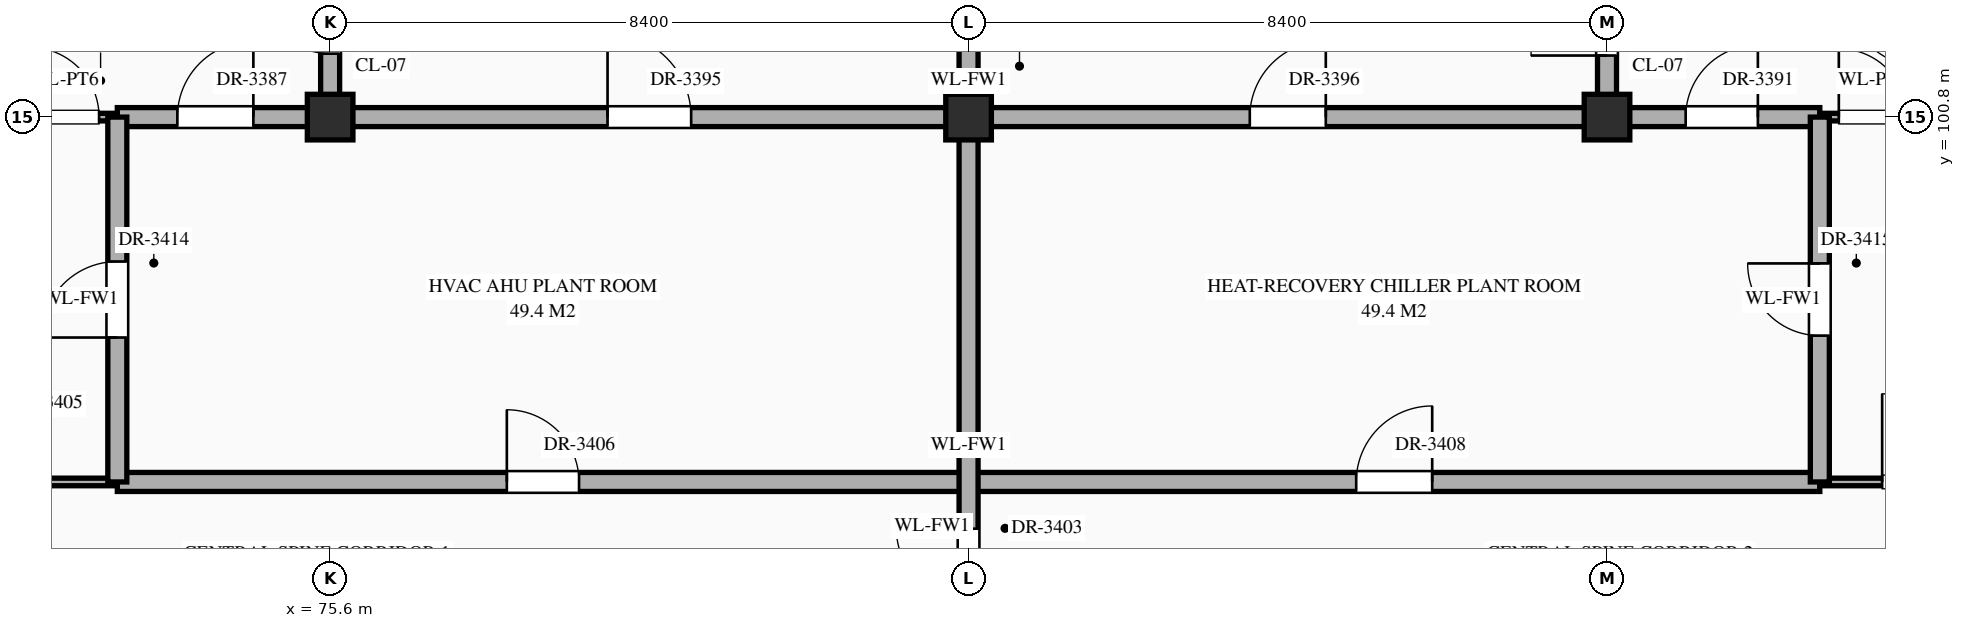
"""IFC4 building model, lengths in metres.
Left out: names, types, materials, properties, quantities, classifications, styles, units other than length and angle.
Written with IfcOpenShell. Run it as: python <this file> out.ifc"""

import sys

from ifc_helpers import new_model, si_unit, direction, frame, frame_2d, origin, origin_2d, place, context, subcontext, project, spatial, rectangle, extrude, element, fill, save


model = new_model("IFC4")
c1 = context("Model", 3, precision=1e-05, world=origin(), true_north=direction((0.0, 1.0)))
c2 = subcontext(c1, "Body", "Model", "MODEL_VIEW")
j1 = project(units=[si_unit("LENGTHUNIT", "METRE"), si_unit("PLANEANGLEUNIT", "RADIAN")], contexts=[c1])
p1 = place(None, origin())
s1 = spatial("IfcSite", under=j1, at=p1, CompositionType="ELEMENT")
p2 = place(p1, origin())
s2 = spatial("IfcBuilding", under=s1, at=p2, CompositionType="ELEMENT")
p3 = place(p2, frame((0.0, 0.0, 68.7)))
s3 = spatial("IfcBuildingStorey", under=s2, at=p3, CompositionType="ELEMENT", Elevation=68.7)
for number, where, z_axis, x_axis in (
    (1, (75.6, 100.8, 0.0), (0.0, 0.0, 1.0), (1.0, 0.0, 0.0)),
    (2, (84.0, 100.8, 0.0), (0.0, 0.0, 1.0), (1.0, 0.0, 0.0)),
    (3, (92.4, 100.8, 0.0), (0.0, 0.0, 1.0), (1.0, 0.0, 0.0)),
):
    element("IfcColumn", number, at=place(p3, frame(where, z_axis=z_axis, x_axis=x_axis)), inside=s3, PredefinedType="COLUMN", context=c2, shape_type="SweptSolid", body=[
        extrude(rectangle(XDim=0.6, YDim=0.6, at=origin_2d()), origin(), (0.0, 0.0, 1.0), 4.5),
    ])
p4 = place(p3, frame((70.0, 96.0, 0.0), z_axis=(0.0, 0.0, 1.0), x_axis=(1.0, 0.0, 0.0)))
e4 = element("IfcWall", 4, at=p4, inside=s3, PredefinedType="STANDARD", context=c2, shape_type="SweptSolid", body=[
    extrude(rectangle(XDim=2.8, YDim=0.1, at=frame_2d((1.4, 0.0))), origin(), (0.0, 0.0, 1.0), 4.12),
])
p5 = place(p4, frame((0.9, 0.0, 0.0)))
e5 = element("IfcOpeningElement", 5, at=p5, cuts=e4, PredefinedType="OPENING", context=c2, shape_type="SweptSolid", body=[
    extrude(rectangle(XDim=1.0, YDim=2.25, at=frame_2d((0.5, 1.125))), frame((0.0, 0.062, 0.0), z_axis=(0.0, -1.0, 0.0), x_axis=(1.0, 0.0, 0.0)), (0.0, 0.0, 1.0), 0.124),
])
p6 = place(p3, frame((72.8, 96.0, 0.0), z_axis=(0.0, 0.0, 1.0), x_axis=(1.0, 0.0, 0.0)))
e6 = element("IfcWall", 6, at=p6, inside=s3, PredefinedType="STANDARD", context=c2, shape_type="SweptSolid", body=[
    extrude(rectangle(XDim=22.4, YDim=0.25, at=frame_2d((11.2, 0.0))), origin(), (0.0, 0.0, 1.0), 4.12),
])
p7 = place(p6, frame((5.125, 0.0, 0.0)))
e7 = element("IfcOpeningElement", 7, at=p7, cuts=e6, PredefinedType="OPENING", context=c2, shape_type="SweptSolid", body=[
    extrude(rectangle(XDim=0.95, YDim=2.15, at=frame_2d((0.475, 1.075))), frame((0.0, 0.137, 0.0), z_axis=(0.0, -1.0, 0.0), x_axis=(1.0, 0.0, 0.0)), (0.0, 0.0, 1.0), 0.274),
])
p8 = place(p6, frame((16.3, 0.0, 0.0)))
e8 = element("IfcOpeningElement", 8, at=p8, cuts=e6, PredefinedType="OPENING", context=c2, shape_type="SweptSolid", body=[
    extrude(rectangle(XDim=1.0, YDim=2.2, at=frame_2d((0.5, 1.1))), frame((0.0, 0.137, 0.0), z_axis=(0.0, -1.0, 0.0), x_axis=(1.0, 0.0, 0.0)), (0.0, 0.0, 1.0), 0.274),
])
p9 = place(p3, frame((95.2, 96.0, 0.0), z_axis=(0.0, 0.0, 1.0), x_axis=(1.0, 0.0, 0.0)))
e9 = element("IfcWall", 9, at=p9, inside=s3, PredefinedType="STANDARD", context=c2, shape_type="SweptSolid", body=[
    extrude(rectangle(XDim=2.8, YDim=0.1, at=frame_2d((1.4, 0.0))), origin(), (0.0, 0.0, 1.0), 4.12),
])
p10 = place(p9, frame((0.82, 0.0, 0.0)))
e10 = element("IfcOpeningElement", 10, at=p10, cuts=e9, PredefinedType="OPENING", context=c2, shape_type="SweptSolid", body=[
    extrude(rectangle(XDim=1.16, YDim=2.3, at=frame_2d((0.58, 1.15))), frame((0.0, 0.062, 0.0), z_axis=(0.0, -1.0, 0.0), x_axis=(1.0, 0.0, 0.0)), (0.0, 0.0, 1.0), 0.124),
])
p11 = place(p3, frame((71.4, 100.8, 0.0), z_axis=(0.0, 0.0, 1.0), x_axis=(1.0, 0.0, 0.0)))
e11 = element("IfcWall", 11, at=p11, inside=s3, PredefinedType="STANDARD", context=c2, shape_type="SweptSolid", body=[
    extrude(rectangle(XDim=1.4, YDim=0.1, at=frame_2d((0.7, 0.0))), origin(), (0.0, 0.0, 1.0), 3.27),
])
p12 = place(p11, frame((0.24, 0.0, 0.0)))
e12 = element("IfcOpeningElement", 12, at=p12, cuts=e11, PredefinedType="OPENING", context=c2, shape_type="SweptSolid", body=[
    extrude(rectangle(XDim=0.92, YDim=2.15, at=frame_2d((0.46, 1.075))), frame((0.0, 0.062, 0.0), z_axis=(0.0, -1.0, 0.0), x_axis=(1.0, 0.0, 0.0)), (0.0, 0.0, 1.0), 0.124),
])
p13 = place(p3, frame((72.8, 100.8, 0.0), z_axis=(0.0, 0.0, 1.0), x_axis=(1.0, 0.0, 0.0)))
e13 = element("IfcWall", 13, at=p13, inside=s3, PredefinedType="STANDARD", context=c2, shape_type="SweptSolid", body=[
    extrude(rectangle(XDim=22.4, YDim=0.25, at=frame_2d((11.2, 0.0))), origin(), (0.0, 0.0, 1.0), 3.27),
])
p14 = place(p13, frame((0.79, 0.0, 0.0)))
e14 = element("IfcOpeningElement", 14, at=p14, cuts=e13, PredefinedType="OPENING", context=c2, shape_type="SweptSolid", body=[
    extrude(rectangle(XDim=1.0, YDim=2.2, at=frame_2d((0.5, 1.1))), frame((0.0, 0.137, 0.0), z_axis=(0.0, -1.0, 0.0), x_axis=(1.0, 0.0, 0.0)), (0.0, 0.0, 1.0), 0.274),
])
p15 = place(p13, frame((20.635, 0.0, 0.0)))
e15 = element("IfcOpeningElement", 15, at=p15, cuts=e13, PredefinedType="OPENING", context=c2, shape_type="SweptSolid", body=[
    extrude(rectangle(XDim=0.95, YDim=2.15, at=frame_2d((0.475, 1.075))), frame((0.0, 0.137, 0.0), z_axis=(0.0, -1.0, 0.0), x_axis=(1.0, 0.0, 0.0)), (0.0, 0.0, 1.0), 0.274),
])
p16 = place(p13, frame((6.45, 0.0, 0.0)))
e16 = element("IfcOpeningElement", 16, at=p16, cuts=e13, PredefinedType="OPENING", context=c2, shape_type="SweptSolid", body=[
    extrude(rectangle(XDim=1.1, YDim=2.2, at=frame_2d((0.55, 1.1))), frame((0.0, 0.137, 0.0), z_axis=(0.0, -1.0, 0.0), x_axis=(1.0, 0.0, 0.0)), (0.0, 0.0, 1.0), 0.274),
])
p17 = place(p13, frame((14.9, 0.0, 0.0)))
e17 = element("IfcOpeningElement", 17, at=p17, cuts=e13, PredefinedType="OPENING", context=c2, shape_type="SweptSolid", body=[
    extrude(rectangle(XDim=1.0, YDim=2.2, at=frame_2d((0.5, 1.1))), frame((0.0, 0.137, 0.0), z_axis=(0.0, -1.0, 0.0), x_axis=(1.0, 0.0, 0.0)), (0.0, 0.0, 1.0), 0.274),
])
p18 = place(p3, frame((95.2, 100.8, 0.0), z_axis=(0.0, 0.0, 1.0), x_axis=(1.0, 0.0, 0.0)))
e18 = element("IfcWall", 18, at=p18, inside=s3, PredefinedType="STANDARD", context=c2, shape_type="SweptSolid", body=[
    extrude(rectangle(XDim=1.4, YDim=0.1, at=frame_2d((0.7, 0.0))), origin(), (0.0, 0.0, 1.0), 3.27),
])
p19 = place(p18, frame((0.25, 0.0, 0.0)))
e19 = element("IfcOpeningElement", 19, at=p19, cuts=e18, PredefinedType="OPENING", context=c2, shape_type="SweptSolid", body=[
    extrude(rectangle(XDim=0.9, YDim=2.15, at=frame_2d((0.45, 1.075))), frame((0.0, 0.062, 0.0), z_axis=(0.0, -1.0, 0.0), x_axis=(1.0, 0.0, 0.0)), (0.0, 0.0, 1.0), 0.124),
])
p20 = place(p3, frame((72.8, 96.0, 0.0), z_axis=(0.0, 0.0, 1.0), x_axis=(0.0, 1.0, 0.0)))
e20 = element("IfcWall", 20, at=p20, inside=s3, PredefinedType="STANDARD", context=c2, shape_type="SweptSolid", body=[
    extrude(rectangle(XDim=4.8, YDim=0.25, at=frame_2d((2.4, 0.0))), origin(), (0.0, 0.0, 1.0), 4.12),
])
p21 = place(p20, frame((1.9, 0.0, 0.0)))
e21 = element("IfcOpeningElement", 21, at=p21, cuts=e20, PredefinedType="OPENING", context=c2, shape_type="SweptSolid", body=[
    extrude(rectangle(XDim=1.0, YDim=2.2, at=frame_2d((0.5, 1.1))), frame((0.0, 0.137, 0.0), z_axis=(0.0, -1.0, 0.0), x_axis=(1.0, 0.0, 0.0)), (0.0, 0.0, 1.0), 0.274),
])
p22 = place(p3, frame((75.6, 100.8, 0.0), z_axis=(0.0, 0.0, 1.0), x_axis=(0.0, 1.0, 0.0)))
e22 = element("IfcWall", 22, at=p22, inside=s3, PredefinedType="STANDARD", context=c2, shape_type="SweptSolid", body=[
    extrude(rectangle(XDim=3.6, YDim=0.25, at=frame_2d((1.8, 0.0))), origin(), (0.0, 0.0, 1.0), 3.37),
])
p23 = place(p22, frame((0.835, 0.0, 0.0)))
e23 = element("IfcOpeningElement", 23, at=p23, cuts=e22, PredefinedType="OPENING", context=c2, shape_type="SweptSolid", body=[
    extrude(rectangle(XDim=0.95, YDim=2.15, at=frame_2d((0.475, 1.075))), frame((0.0, 0.137, 0.0), z_axis=(0.0, -1.0, 0.0), x_axis=(1.0, 0.0, 0.0)), (0.0, 0.0, 1.0), 0.274),
])
p24 = place(p3, frame((84.0, 86.44, 0.0), z_axis=(0.0, 0.0, 1.0), x_axis=(0.0, 1.0, 0.0)))
e24 = element("IfcWall", 24, at=p24, inside=s3, PredefinedType="STANDARD", context=c2, shape_type="SweptSolid", body=[
    extrude(rectangle(XDim=17.96, YDim=0.25, at=frame_2d((8.98, 0.0))), origin(), (0.0, 0.0, 1.0), 3.37),
])
p25 = place(p24, frame((15.52, 0.0, 0.0)))
e25 = element("IfcOpeningElement", 25, at=p25, cuts=e24, PredefinedType="OPENING", context=c2, shape_type="SweptSolid", body=[
    extrude(rectangle(XDim=1.5, YDim=2.25, at=frame_2d((0.75, 1.125))), frame((0.0, 0.137, 0.0), z_axis=(0.0, -1.0, 0.0), x_axis=(1.0, 0.0, 0.0)), (0.0, 0.0, 1.0), 0.274),
])
p26 = place(p24, frame((5.35, 0.0, 0.0)))
e26 = element("IfcOpeningElement", 26, at=p26, cuts=e24, PredefinedType="OPENING", context=c2, shape_type="SweptSolid", body=[
    extrude(rectangle(XDim=1.0, YDim=2.2, at=frame_2d((0.5, 1.1))), frame((0.0, 0.137, 0.0), z_axis=(0.0, -1.0, 0.0), x_axis=(1.0, 0.0, 0.0)), (0.0, 0.0, 1.0), 0.274),
])
p27 = place(p24, frame((7.995, 0.0, 0.0)))
e27 = element("IfcOpeningElement", 27, at=p27, cuts=e24, PredefinedType="OPENING", context=c2, shape_type="SweptSolid", body=[
    extrude(rectangle(XDim=0.95, YDim=2.15, at=frame_2d((0.475, 1.075))), frame((0.0, 0.137, 0.0), z_axis=(0.0, -1.0, 0.0), x_axis=(1.0, 0.0, 0.0)), (0.0, 0.0, 1.0), 0.274),
])
p28 = place(p3, frame((92.4, 100.8, 0.0), z_axis=(0.0, 0.0, 1.0), x_axis=(0.0, 1.0, 0.0)))
e28 = element("IfcWall", 28, at=p28, inside=s3, PredefinedType="STANDARD", context=c2, shape_type="SweptSolid", body=[
    extrude(rectangle(XDim=3.6, YDim=0.25, at=frame_2d((1.8, 0.0))), origin(), (0.0, 0.0, 1.0), 3.37),
])
p29 = place(p28, frame((0.81, 0.0, 0.0)))
e29 = element("IfcOpeningElement", 29, at=p29, cuts=e28, PredefinedType="OPENING", context=c2, shape_type="SweptSolid", body=[
    extrude(rectangle(XDim=1.0, YDim=2.2, at=frame_2d((0.5, 1.1))), frame((0.0, 0.137, 0.0), z_axis=(0.0, -1.0, 0.0), x_axis=(1.0, 0.0, 0.0)), (0.0, 0.0, 1.0), 0.274),
])
p30 = place(p3, frame((95.2, 96.0, 0.0), z_axis=(0.0, 0.0, 1.0), x_axis=(0.0, 1.0, 0.0)))
e30 = element("IfcWall", 30, at=p30, inside=s3, PredefinedType="STANDARD", context=c2, shape_type="SweptSolid", body=[
    extrude(rectangle(XDim=4.8, YDim=0.25, at=frame_2d((2.4, 0.0))), origin(), (0.0, 0.0, 1.0), 4.12),
])
p31 = place(p30, frame((1.925, 0.0, 0.0)))
e31 = element("IfcOpeningElement", 31, at=p31, cuts=e30, PredefinedType="OPENING", context=c2, shape_type="SweptSolid", body=[
    extrude(rectangle(XDim=0.95, YDim=2.15, at=frame_2d((0.475, 1.075))), frame((0.0, 0.137, 0.0), z_axis=(0.0, -1.0, 0.0), x_axis=(1.0, 0.0, 0.0)), (0.0, 0.0, 1.0), 0.274),
])
p32 = place(p23, origin())
e32 = element("IfcDoor", 32, at=p32, inside=s3, OperationType="SINGLE_SWING_RIGHT", PredefinedType="DOOR", context=c2, shape_type="SweptSolid", body=[
    extrude(rectangle(XDim=0.95, YDim=2.15, at=frame_2d((0.475, 1.075))), frame((0.0, 0.025, 0.0), z_axis=(0.0, -1.0, 0.0), x_axis=(1.0, 0.0, 0.0)), (0.0, 0.0, 1.0), 0.05),
])
fill(e23, e32)
p33 = place(p12, origin())
e33 = element("IfcDoor", 33, at=p33, inside=s3, OperationType="SINGLE_SWING_LEFT", PredefinedType="DOOR", context=c2, shape_type="SweptSolid", body=[
    extrude(rectangle(XDim=0.92, YDim=2.15, at=frame_2d((0.46, 1.075))), frame((0.0, 0.025, 0.0), z_axis=(0.0, -1.0, 0.0), x_axis=(1.0, 0.0, 0.0)), (0.0, 0.0, 1.0), 0.05),
])
fill(e12, e33)
p34 = place(p14, origin())
e34 = element("IfcDoor", 34, at=p34, inside=s3, OperationType="SINGLE_SWING_RIGHT", PredefinedType="DOOR", context=c2, shape_type="SweptSolid", body=[
    extrude(rectangle(XDim=1.0, YDim=2.2, at=frame_2d((0.5, 1.1))), frame((0.0, 0.025, 0.0), z_axis=(0.0, -1.0, 0.0), x_axis=(1.0, 0.0, 0.0)), (0.0, 0.0, 1.0), 0.05),
])
fill(e14, e34)
p35 = place(p29, origin())
e35 = element("IfcDoor", 35, at=p35, inside=s3, OperationType="SINGLE_SWING_LEFT", PredefinedType="DOOR", context=c2, shape_type="SweptSolid", body=[
    extrude(rectangle(XDim=1.0, YDim=2.2, at=frame_2d((0.5, 1.1))), frame((0.0, 0.025, 0.0), z_axis=(0.0, -1.0, 0.0), x_axis=(1.0, 0.0, 0.0)), (0.0, 0.0, 1.0), 0.05),
])
fill(e29, e35)
p36 = place(p15, origin())
e36 = element("IfcDoor", 36, at=p36, inside=s3, OperationType="SINGLE_SWING_RIGHT", PredefinedType="DOOR", context=c2, shape_type="SweptSolid", body=[
    extrude(rectangle(XDim=0.95, YDim=2.15, at=frame_2d((0.475, 1.075))), frame((0.0, 0.025, 0.0), z_axis=(0.0, -1.0, 0.0), x_axis=(1.0, 0.0, 0.0)), (0.0, 0.0, 1.0), 0.05),
])
fill(e15, e36)
p37 = place(p19, origin())
e37 = element("IfcDoor", 37, at=p37, inside=s3, OperationType="SINGLE_SWING_LEFT", PredefinedType="DOOR", context=c2, shape_type="SweptSolid", body=[
    extrude(rectangle(XDim=0.9, YDim=2.15, at=frame_2d((0.45, 1.075))), frame((0.0, 0.025, 0.0), z_axis=(0.0, -1.0, 0.0), x_axis=(1.0, 0.0, 0.0)), (0.0, 0.0, 1.0), 0.05),
])
fill(e19, e37)
p38 = place(p16, origin())
e38 = element("IfcDoor", 38, at=p38, inside=s3, OperationType="SINGLE_SWING_LEFT", PredefinedType="DOOR", context=c2, shape_type="SweptSolid", body=[
    extrude(rectangle(XDim=1.1, YDim=2.2, at=frame_2d((0.55, 1.1))), frame((0.0, 0.025, 0.0), z_axis=(0.0, -1.0, 0.0), x_axis=(1.0, 0.0, 0.0)), (0.0, 0.0, 1.0), 0.05),
])
fill(e16, e38)
p39 = place(p17, origin())
e39 = element("IfcDoor", 39, at=p39, inside=s3, OperationType="SINGLE_SWING_RIGHT", PredefinedType="DOOR", context=c2, shape_type="SweptSolid", body=[
    extrude(rectangle(XDim=1.0, YDim=2.2, at=frame_2d((0.5, 1.1))), frame((0.0, 0.025, 0.0), z_axis=(0.0, -1.0, 0.0), x_axis=(1.0, 0.0, 0.0)), (0.0, 0.0, 1.0), 0.05),
])
fill(e17, e39)
p40 = place(p27, origin())
e40 = element("IfcDoor", 40, at=p40, inside=s3, OperationType="SINGLE_SWING_RIGHT", PredefinedType="DOOR", context=c2, shape_type="SweptSolid", body=[
    extrude(rectangle(XDim=0.95, YDim=2.15, at=frame_2d((0.475, 1.075))), frame((0.0, 0.025, 0.0), z_axis=(0.0, -1.0, 0.0), x_axis=(1.0, 0.0, 0.0)), (0.0, 0.0, 1.0), 0.05),
])
fill(e27, e40)
p41 = place(p7, origin())
e41 = element("IfcDoor", 41, at=p41, inside=s3, OperationType="SINGLE_SWING_LEFT", PredefinedType="DOOR", context=c2, shape_type="SweptSolid", body=[
    extrude(rectangle(XDim=0.95, YDim=2.15, at=frame_2d((0.475, 1.075))), frame((0.0, 0.025, 0.0), z_axis=(0.0, -1.0, 0.0), x_axis=(1.0, 0.0, 0.0)), (0.0, 0.0, 1.0), 0.05),
])
fill(e7, e41)
p42 = place(p8, origin())
e42 = element("IfcDoor", 42, at=p42, inside=s3, OperationType="SINGLE_SWING_RIGHT", PredefinedType="DOOR", context=c2, shape_type="SweptSolid", body=[
    extrude(rectangle(XDim=1.0, YDim=2.2, at=frame_2d((0.5, 1.1))), frame((0.0, 0.025, 0.0), z_axis=(0.0, -1.0, 0.0), x_axis=(1.0, 0.0, 0.0)), (0.0, 0.0, 1.0), 0.05),
])
fill(e8, e42)
p43 = place(p10, origin())
e43 = element("IfcDoor", 43, at=p43, inside=s3, OperationType="SINGLE_SWING_LEFT", PredefinedType="DOOR", context=c2, shape_type="SweptSolid", body=[
    extrude(rectangle(XDim=1.16, YDim=2.3, at=frame_2d((0.58, 1.15))), frame((0.0, 0.025, 0.0), z_axis=(0.0, -1.0, 0.0), x_axis=(1.0, 0.0, 0.0)), (0.0, 0.0, 1.0), 0.05),
])
fill(e10, e43)
p44 = place(p21, origin())
e44 = element("IfcDoor", 44, at=p44, inside=s3, OperationType="SINGLE_SWING_LEFT", PredefinedType="DOOR", context=c2, shape_type="SweptSolid", body=[
    extrude(rectangle(XDim=1.0, YDim=2.2, at=frame_2d((0.5, 1.1))), frame((0.0, 0.025, 0.0), z_axis=(0.0, -1.0, 0.0), x_axis=(1.0, 0.0, 0.0)), (0.0, 0.0, 1.0), 0.05),
])
fill(e21, e44)
p45 = place(p31, origin())
e45 = element("IfcDoor", 45, at=p45, inside=s3, OperationType="SINGLE_SWING_RIGHT", PredefinedType="DOOR", context=c2, shape_type="SweptSolid", body=[
    extrude(rectangle(XDim=0.95, YDim=2.15, at=frame_2d((0.475, 1.075))), frame((0.0, 0.025, 0.0), z_axis=(0.0, -1.0, 0.0), x_axis=(1.0, 0.0, 0.0)), (0.0, 0.0, 1.0), 0.05),
])
fill(e31, e45)
save(model, sys.argv[1])
